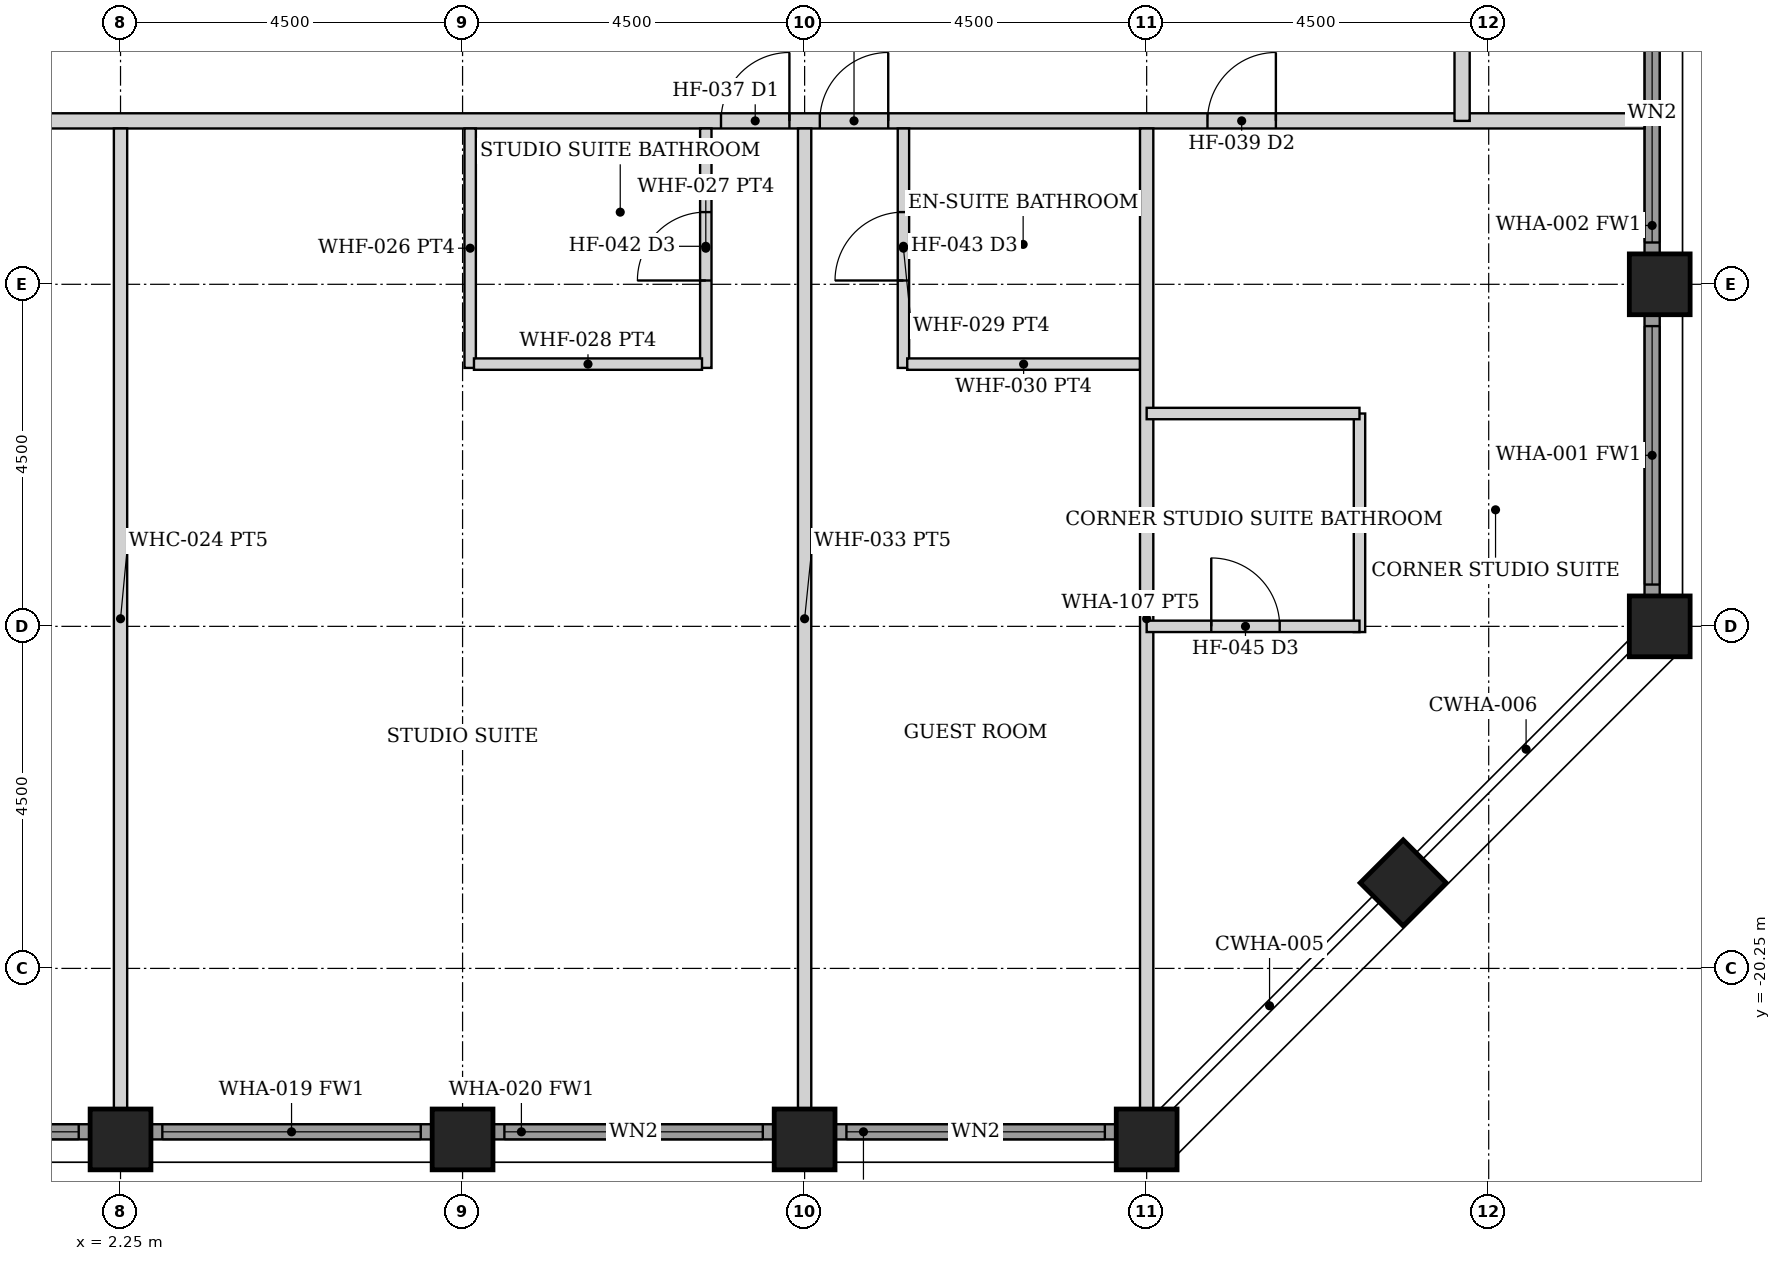
"""IFC4 building model, lengths in metres.
Left out: names, types, materials, properties, quantities, classifications, styles, units other than length and angle.
Written with IfcOpenShell. Run it as: python <this file> out.ifc"""

import sys

from ifc_helpers import new_model, si_unit, direction, frame, frame_2d, origin, origin_2d, place, context, subcontext, project, spatial, rectangle, hollow_rectangle, extrude, element, fill, save


model = new_model("IFC4")
c1 = context("Model", 3, precision=1e-05, world=origin(), true_north=direction((0.0, 1.0)))
c2 = subcontext(c1, "Body", "Model", "MODEL_VIEW")
j1 = project(units=[si_unit("LENGTHUNIT", "METRE"), si_unit("PLANEANGLEUNIT", "RADIAN")], contexts=[c1])
p1 = place(None, origin())
s1 = spatial("IfcSite", under=j1, at=p1, CompositionType="ELEMENT")
p2 = place(p1, origin())
s2 = spatial("IfcBuilding", under=s1, at=p2, CompositionType="ELEMENT")
p3 = place(p2, frame((0.0, 0.0, 172.4)))
s3 = spatial("IfcBuildingStorey", under=s2, at=p3, CompositionType="ELEMENT", Elevation=172.4)
for number, where, z_axis, x_axis in (
    (1, (22.5, -15.75, 0.0), (0.0, 0.0, 1.0), (1.0, 0.0, 0.0)),
    (2, (22.5, -11.25, 0.0), (0.0, 0.0, 1.0), (1.0, 0.0, 0.0)),
    (3, (2.25, -22.5, 0.0), (0.0, 0.0, 1.0), (0.0, 1.0, 0.0)),
    (4, (6.75, -22.5, 0.0), (0.0, 0.0, 1.0), (0.0, 1.0, 0.0)),
    (5, (11.25, -22.5, 0.0), (0.0, 0.0, 1.0), (0.0, 1.0, 0.0)),
    (6, (15.75, -22.5, 0.0), (0.0, 0.0, 1.0), (0.0, 1.0, 0.0)),
    (7, (19.125, -19.125, 0.0), (0.0, 0.0, 1.0), (0.707, -0.707, 0.0)),
):
    element("IfcColumn", number, at=place(p3, frame(where, z_axis=z_axis, x_axis=x_axis)), inside=s3, PredefinedType="COLUMN", context=c2, shape_type="SweptSolid", body=[
        extrude(hollow_rectangle(XDim=0.8, YDim=0.8, WallThickness=0.045, at=origin_2d()), origin(), (0.0, 0.0, 1.0), 3.6),
    ])
p4 = place(p3, frame((-1.845, -22.4, 0.0), z_axis=(0.0, 0.0, 1.0), x_axis=(1.0, 0.0, 0.0)))
e8 = element("IfcWall", 8, at=p4, inside=s3, PredefinedType="SOLIDWALL", context=c2, shape_type="SweptSolid", body=[
    extrude(rectangle(XDim=3.69, YDim=0.2, at=frame_2d((1.845, 0.0))), origin(), (0.0, 0.0, 1.0), 2.479),
])
p5 = place(p4, frame((0.145, 0.0, 0.3)))
e9 = element("IfcOpeningElement", 9, at=p5, cuts=e8, PredefinedType="OPENING", context=c2, shape_type="SweptSolid", body=[
    extrude(rectangle(XDim=3.4, YDim=2.029, at=frame_2d((1.7, 1.015))), frame((0.0, 0.11, 0.0), z_axis=(0.0, -1.0, 0.0), x_axis=(1.0, 0.0, 0.0)), (0.0, 0.0, 1.0), 0.22),
])
p6 = place(p3, frame((2.655, -22.4, 0.0), z_axis=(0.0, 0.0, 1.0), x_axis=(1.0, 0.0, 0.0)))
e10 = element("IfcWall", 10, at=p6, inside=s3, PredefinedType="SOLIDWALL", context=c2, shape_type="SweptSolid", body=[
    extrude(rectangle(XDim=3.69, YDim=0.2, at=frame_2d((1.845, 0.0))), origin(), (0.0, 0.0, 1.0), 2.479),
])
p7 = place(p6, frame((0.145, 0.0, 0.3)))
e11 = element("IfcOpeningElement", 11, at=p7, cuts=e10, PredefinedType="OPENING", context=c2, shape_type="SweptSolid", body=[
    extrude(rectangle(XDim=3.4, YDim=2.029, at=frame_2d((1.7, 1.015))), frame((0.0, 0.11, 0.0), z_axis=(0.0, -1.0, 0.0), x_axis=(1.0, 0.0, 0.0)), (0.0, 0.0, 1.0), 0.22),
])
p8 = place(p3, frame((7.155, -22.4, 0.0), z_axis=(0.0, 0.0, 1.0), x_axis=(1.0, 0.0, 0.0)))
e12 = element("IfcWall", 12, at=p8, inside=s3, PredefinedType="SOLIDWALL", context=c2, shape_type="SweptSolid", body=[
    extrude(rectangle(XDim=3.69, YDim=0.2, at=frame_2d((1.845, 0.0))), origin(), (0.0, 0.0, 1.0), 2.479),
])
p9 = place(p8, frame((0.145, 0.0, 0.3)))
e13 = element("IfcOpeningElement", 13, at=p9, cuts=e12, PredefinedType="OPENING", context=c2, shape_type="SweptSolid", body=[
    extrude(rectangle(XDim=3.4, YDim=2.029, at=frame_2d((1.7, 1.015))), frame((0.0, 0.11, 0.0), z_axis=(0.0, -1.0, 0.0), x_axis=(1.0, 0.0, 0.0)), (0.0, 0.0, 1.0), 0.22),
])
p10 = place(p3, frame((11.655, -22.4, 0.0), z_axis=(0.0, 0.0, 1.0), x_axis=(1.0, 0.0, 0.0)))
e14 = element("IfcWall", 14, at=p10, inside=s3, PredefinedType="SOLIDWALL", context=c2, shape_type="SweptSolid", body=[
    extrude(rectangle(XDim=3.69, YDim=0.2, at=frame_2d((1.845, 0.0))), origin(), (0.0, 0.0, 1.0), 2.479),
])
p11 = place(p10, frame((0.145, 0.0, 0.3)))
e15 = element("IfcOpeningElement", 15, at=p11, cuts=e14, PredefinedType="OPENING", context=c2, shape_type="SweptSolid", body=[
    extrude(rectangle(XDim=3.4, YDim=2.029, at=frame_2d((1.7, 1.015))), frame((0.0, 0.11, 0.0), z_axis=(0.0, -1.0, 0.0), x_axis=(1.0, 0.0, 0.0)), (0.0, 0.0, 1.0), 0.22),
])
p12 = place(p3, frame((22.4, -15.345, 0.0), z_axis=(0.0, 0.0, 1.0), x_axis=(0.0, 1.0, 0.0)))
e16 = element("IfcWall", 16, at=p12, inside=s3, PredefinedType="SOLIDWALL", context=c2, shape_type="SweptSolid", body=[
    extrude(rectangle(XDim=3.69, YDim=0.2, at=frame_2d((1.845, 0.0))), origin(), (0.0, 0.0, 1.0), 2.479),
])
p13 = place(p12, frame((0.145, 0.0, 0.3)))
e17 = element("IfcOpeningElement", 17, at=p13, cuts=e16, PredefinedType="OPENING", context=c2, shape_type="SweptSolid", body=[
    extrude(rectangle(XDim=3.4, YDim=2.029, at=frame_2d((1.7, 1.015))), frame((0.0, 0.11, 0.0), z_axis=(0.0, -1.0, 0.0), x_axis=(1.0, 0.0, 0.0)), (0.0, 0.0, 1.0), 0.22),
])
p14 = place(p3, frame((22.4, -10.845, 0.0), z_axis=(0.0, 0.0, 1.0), x_axis=(0.0, 1.0, 0.0)))
e18 = element("IfcWall", 18, at=p14, inside=s3, PredefinedType="SOLIDWALL", context=c2, shape_type="SweptSolid", body=[
    extrude(rectangle(XDim=3.69, YDim=0.2, at=frame_2d((1.845, 0.0))), origin(), (0.0, 0.0, 1.0), 2.479),
])
p15 = place(p14, frame((0.145, 0.0, 0.3)))
e19 = element("IfcOpeningElement", 19, at=p15, cuts=e18, PredefinedType="OPENING", context=c2, shape_type="SweptSolid", body=[
    extrude(rectangle(XDim=3.4, YDim=2.029, at=frame_2d((1.7, 1.015))), frame((0.0, 0.11, 0.0), z_axis=(0.0, -1.0, 0.0), x_axis=(1.0, 0.0, 0.0)), (0.0, 0.0, 1.0), 0.22),
])
p16 = place(p3, frame((-22.3, -9.1, 0.0), z_axis=(0.0, 0.0, 1.0), x_axis=(1.0, 0.0, 0.0)))
e20 = element("IfcWall", 20, at=p16, inside=s3, PredefinedType="PARTITIONING", context=c2, shape_type="SweptSolid", body=[
    extrude(rectangle(XDim=44.6, YDim=0.2, at=frame_2d((22.3, 0.0))), origin(), (0.0, 0.0, 1.0), 2.473),
])
p17 = place(p16, frame((6.75, 0.0, 0.0)))
e21 = element("IfcOpeningElement", 21, at=p17, cuts=e20, PredefinedType="OPENING", context=c2, shape_type="SweptSolid", body=[
    extrude(rectangle(XDim=0.9, YDim=2.1, at=frame_2d((0.45, 1.05))), frame((0.0, 0.11, 0.0), z_axis=(0.0, -1.0, 0.0), x_axis=(1.0, 0.0, 0.0)), (0.0, 0.0, 1.0), 0.22),
])
p18 = place(p16, frame((15.75, 0.0, 0.0)))
e22 = element("IfcOpeningElement", 22, at=p18, cuts=e20, PredefinedType="OPENING", context=c2, shape_type="SweptSolid", body=[
    extrude(rectangle(XDim=0.9, YDim=2.1, at=frame_2d((0.45, 1.05))), frame((0.0, 0.11, 0.0), z_axis=(0.0, -1.0, 0.0), x_axis=(1.0, 0.0, 0.0)), (0.0, 0.0, 1.0), 0.22),
])
p19 = place(p16, frame((32.45, 0.0, 0.0)))
e23 = element("IfcOpeningElement", 23, at=p19, cuts=e20, PredefinedType="OPENING", context=c2, shape_type="SweptSolid", body=[
    extrude(rectangle(XDim=0.9, YDim=2.1, at=frame_2d((0.45, 1.05))), frame((0.0, 0.11, 0.0), z_axis=(0.0, -1.0, 0.0), x_axis=(1.0, 0.0, 0.0)), (0.0, 0.0, 1.0), 0.22),
])
p20 = place(p16, frame((33.75, 0.0, 0.0)))
e24 = element("IfcOpeningElement", 24, at=p20, cuts=e20, PredefinedType="OPENING", context=c2, shape_type="SweptSolid", body=[
    extrude(rectangle(XDim=0.9, YDim=2.1, at=frame_2d((0.45, 1.05))), frame((0.0, 0.11, 0.0), z_axis=(0.0, -1.0, 0.0), x_axis=(1.0, 0.0, 0.0)), (0.0, 0.0, 1.0), 0.22),
])
p21 = place(p16, frame((38.85, 0.0, 0.0)))
e25 = element("IfcOpeningElement", 25, at=p21, cuts=e20, PredefinedType="OPENING", context=c2, shape_type="SweptSolid", body=[
    extrude(rectangle(XDim=0.9, YDim=2.1, at=frame_2d((0.45, 1.05))), frame((0.0, 0.11, 0.0), z_axis=(0.0, -1.0, 0.0), x_axis=(1.0, 0.0, 0.0)), (0.0, 0.0, 1.0), 0.22),
])
p22 = place(p16, frame((4.85, 0.0, 0.0)))
e26 = element("IfcOpeningElement", 26, at=p22, cuts=e20, PredefinedType="OPENING", context=c2, shape_type="SweptSolid", body=[
    extrude(rectangle(XDim=0.9, YDim=2.1, at=frame_2d((0.45, 1.05))), frame((0.0, 0.11, 0.0), z_axis=(0.0, -1.0, 0.0), x_axis=(1.0, 0.0, 0.0)), (0.0, 0.0, 1.0), 0.22),
])
p23 = place(p3, frame((19.9, -9.1, 0.0), z_axis=(0.0, 0.0, 1.0), x_axis=(0.0, 1.0, 0.0)))
e27 = element("IfcWall", 27, at=p23, inside=s3, PredefinedType="PARTITIONING", context=c2, shape_type="SweptSolid", body=[
    extrude(rectangle(XDim=18.2, YDim=0.2, at=frame_2d((9.1, 0.0))), origin(), (0.0, 0.0, 1.0), 2.473),
])
p24 = place(p23, frame((8.425, 0.0, 0.0)))
e28 = element("IfcOpeningElement", 28, at=p24, cuts=e27, PredefinedType="OPENING", context=c2, shape_type="SweptSolid", body=[
    extrude(rectangle(XDim=1.35, YDim=2.1, at=frame_2d((0.675, 1.05))), frame((0.0, 0.11, 0.0), z_axis=(0.0, -1.0, 0.0), x_axis=(1.0, 0.0, 0.0)), (0.0, 0.0, 1.0), 0.22),
])
p25 = place(p3, frame((9.95, -12.35, 0.0), z_axis=(0.0, 0.0, 1.0), x_axis=(0.0, 1.0, 0.0)))
e29 = element("IfcWall", 29, at=p25, inside=s3, PredefinedType="PARTITIONING", context=c2, shape_type="SweptSolid", body=[
    extrude(rectangle(XDim=3.15, YDim=0.15, at=frame_2d((1.575, 0.0))), origin(), (0.0, 0.0, 1.0), 2.473),
])
p26 = place(p25, frame((1.15, 0.0, 0.0)))
e30 = element("IfcOpeningElement", 30, at=p26, cuts=e29, PredefinedType="OPENING", context=c2, shape_type="SweptSolid", body=[
    extrude(rectangle(XDim=0.9, YDim=2.1, at=frame_2d((0.45, 1.05))), frame((0.0, 0.085, 0.0), z_axis=(0.0, -1.0, 0.0), x_axis=(1.0, 0.0, 0.0)), (0.0, 0.0, 1.0), 0.17),
])
p27 = place(p3, frame((6.85, -12.35, 0.0), z_axis=(0.0, 0.0, 1.0), x_axis=(0.0, 1.0, 0.0)))
e31 = element("IfcWall", 31, at=p27, inside=s3, PredefinedType="PARTITIONING", context=c2, shape_type="SweptSolid", body=[
    extrude(rectangle(XDim=3.15, YDim=0.15, at=frame_2d((1.575, 0.0))), origin(), (0.0, 0.0, 1.0), 2.473),
])
p28 = place(p3, frame((6.9, -12.3, 0.0), z_axis=(0.0, 0.0, 1.0), x_axis=(1.0, 0.0, 0.0)))
e32 = element("IfcWall", 32, at=p28, inside=s3, PredefinedType="PARTITIONING", context=c2, shape_type="SweptSolid", body=[
    extrude(rectangle(XDim=3.0, YDim=0.15, at=frame_2d((1.5, 0.0))), origin(), (0.0, 0.0, 1.0), 2.473),
])
p29 = place(p3, frame((12.55, -12.35, 0.0), z_axis=(0.0, 0.0, 1.0), x_axis=(0.0, 1.0, 0.0)))
e33 = element("IfcWall", 33, at=p29, inside=s3, PredefinedType="PARTITIONING", context=c2, shape_type="SweptSolid", body=[
    extrude(rectangle(XDim=3.15, YDim=0.15, at=frame_2d((1.575, 0.0))), origin(), (0.0, 0.0, 1.0), 2.473),
])
p30 = place(p29, frame((1.15, 0.0, 0.0)))
e34 = element("IfcOpeningElement", 34, at=p30, cuts=e33, PredefinedType="OPENING", context=c2, shape_type="SweptSolid", body=[
    extrude(rectangle(XDim=0.9, YDim=2.1, at=frame_2d((0.45, 1.05))), frame((0.0, 0.085, 0.0), z_axis=(0.0, -1.0, 0.0), x_axis=(1.0, 0.0, 0.0)), (0.0, 0.0, 1.0), 0.17),
])
p31 = place(p3, frame((12.6, -12.3, 0.0), z_axis=(0.0, 0.0, 1.0), x_axis=(1.0, 0.0, 0.0)))
e35 = element("IfcWall", 35, at=p31, inside=s3, PredefinedType="PARTITIONING", context=c2, shape_type="SweptSolid", body=[
    extrude(rectangle(XDim=3.062, YDim=0.15, at=frame_2d((1.531, 0.0))), origin(), (0.0, 0.0, 1.0), 2.473),
])
for number, where, z_axis, x_axis in (
    (36, (2.25, -22.1, 0.0), (0.0, 0.0, 1.0), (0.0, 1.0, 0.0)),
    (37, (11.25, -22.1, 0.0), (0.0, 0.0, 1.0), (0.0, 1.0, 0.0)),
    (38, (15.75, -22.1, 0.0), (0.0, 0.0, 1.0), (0.0, 1.0, 0.0)),
):
    element("IfcWall", number, at=place(p3, frame(where, z_axis=z_axis, x_axis=x_axis)), inside=s3, PredefinedType="PARTITIONING", context=c2, shape_type="SweptSolid", body=[
        extrude(rectangle(XDim=12.9, YDim=0.175, at=frame_2d((6.45, 0.0))), origin(), (0.0, 0.0, 1.0), 2.473),
    ])
p32 = place(p3, frame((18.55, -15.825, 0.0), z_axis=(0.0, 0.0, 1.0), x_axis=(0.0, 1.0, 0.0)))
e39 = element("IfcWall", 39, at=p32, inside=s3, PredefinedType="PARTITIONING", context=c2, shape_type="SweptSolid", body=[
    extrude(rectangle(XDim=2.875, YDim=0.15, at=frame_2d((1.438, 0.0))), origin(), (0.0, 0.0, 1.0), 2.473),
])
p33 = place(p3, frame((15.75, -12.95, 0.0), z_axis=(0.0, 0.0, 1.0), x_axis=(1.0, 0.0, 0.0)))
e40 = element("IfcWall", 40, at=p33, inside=s3, PredefinedType="PARTITIONING", context=c2, shape_type="SweptSolid", body=[
    extrude(rectangle(XDim=2.8, YDim=0.15, at=frame_2d((1.4, 0.0))), origin(), (0.0, 0.0, 1.0), 2.473),
])
p34 = place(p3, frame((15.75, -15.75, 0.0), z_axis=(0.0, 0.0, 1.0), x_axis=(1.0, 0.0, 0.0)))
e41 = element("IfcWall", 41, at=p34, inside=s3, PredefinedType="PARTITIONING", context=c2, shape_type="SweptSolid", body=[
    extrude(rectangle(XDim=2.8, YDim=0.15, at=frame_2d((1.4, 0.0))), origin(), (0.0, 0.0, 1.0), 2.473),
])
p35 = place(p34, frame((0.85, 0.0, 0.0)))
e42 = element("IfcOpeningElement", 42, at=p35, cuts=e41, PredefinedType="OPENING", context=c2, shape_type="SweptSolid", body=[
    extrude(rectangle(XDim=0.9, YDim=2.1, at=frame_2d((0.45, 1.05))), frame((0.0, 0.085, 0.0), z_axis=(0.0, -1.0, 0.0), x_axis=(1.0, 0.0, 0.0)), (0.0, 0.0, 1.0), 0.17),
])
p36 = place(p5, origin())
e43 = element("IfcWindow", 43, at=p36, inside=s3, PartitioningType="SINGLE_PANEL", PredefinedType="WINDOW", context=c2, shape_type="SweptSolid", body=[
    extrude(rectangle(XDim=3.4, YDim=2.029, at=frame_2d((1.7, 1.015))), frame((0.0, 0.03, 0.0), z_axis=(0.0, -1.0, 0.0), x_axis=(1.0, 0.0, 0.0)), (0.0, 0.0, 1.0), 0.06),
])
fill(e9, e43)
p37 = place(p7, origin())
e44 = element("IfcWindow", 44, at=p37, inside=s3, PartitioningType="SINGLE_PANEL", PredefinedType="WINDOW", context=c2, shape_type="SweptSolid", body=[
    extrude(rectangle(XDim=3.4, YDim=2.029, at=frame_2d((1.7, 1.015))), frame((0.0, 0.03, 0.0), z_axis=(0.0, -1.0, 0.0), x_axis=(1.0, 0.0, 0.0)), (0.0, 0.0, 1.0), 0.06),
])
fill(e11, e44)
p38 = place(p9, origin())
e45 = element("IfcWindow", 45, at=p38, inside=s3, PartitioningType="SINGLE_PANEL", PredefinedType="WINDOW", context=c2, shape_type="SweptSolid", body=[
    extrude(rectangle(XDim=3.4, YDim=2.029, at=frame_2d((1.7, 1.015))), frame((0.0, 0.03, 0.0), z_axis=(0.0, -1.0, 0.0), x_axis=(1.0, 0.0, 0.0)), (0.0, 0.0, 1.0), 0.06),
])
fill(e13, e45)
p39 = place(p11, origin())
e46 = element("IfcWindow", 46, at=p39, inside=s3, PartitioningType="SINGLE_PANEL", PredefinedType="WINDOW", context=c2, shape_type="SweptSolid", body=[
    extrude(rectangle(XDim=3.4, YDim=2.029, at=frame_2d((1.7, 1.015))), frame((0.0, 0.03, 0.0), z_axis=(0.0, -1.0, 0.0), x_axis=(1.0, 0.0, 0.0)), (0.0, 0.0, 1.0), 0.06),
])
fill(e15, e46)
p40 = place(p13, origin())
e47 = element("IfcWindow", 47, at=p40, inside=s3, PartitioningType="SINGLE_PANEL", PredefinedType="WINDOW", context=c2, shape_type="SweptSolid", body=[
    extrude(rectangle(XDim=3.4, YDim=2.029, at=frame_2d((1.7, 1.015))), frame((0.0, 0.03, 0.0), z_axis=(0.0, -1.0, 0.0), x_axis=(1.0, 0.0, 0.0)), (0.0, 0.0, 1.0), 0.06),
])
fill(e17, e47)
p41 = place(p15, origin())
e48 = element("IfcWindow", 48, at=p41, inside=s3, PartitioningType="SINGLE_PANEL", PredefinedType="WINDOW", context=c2, shape_type="SweptSolid", body=[
    extrude(rectangle(XDim=3.4, YDim=2.029, at=frame_2d((1.7, 1.015))), frame((0.0, 0.03, 0.0), z_axis=(0.0, -1.0, 0.0), x_axis=(1.0, 0.0, 0.0)), (0.0, 0.0, 1.0), 0.06),
])
fill(e19, e48)
p42 = place(p19, origin())
e49 = element("IfcDoor", 49, at=p42, inside=s3, OperationType="SINGLE_SWING_RIGHT", PredefinedType="DOOR", context=c2, shape_type="SweptSolid", body=[
    extrude(rectangle(XDim=0.9, YDim=2.1, at=frame_2d((0.45, 1.05))), frame((0.0, 0.025, 0.0), z_axis=(0.0, -1.0, 0.0), x_axis=(1.0, 0.0, 0.0)), (0.0, 0.0, 1.0), 0.05),
])
fill(e23, e49)
p43 = place(p26, origin())
e50 = element("IfcDoor", 50, at=p43, inside=s3, OperationType="SINGLE_SWING_LEFT", PredefinedType="DOOR", context=c2, shape_type="SweptSolid", body=[
    extrude(rectangle(XDim=0.9, YDim=2.1, at=frame_2d((0.45, 1.05))), frame((0.0, 0.025, 0.0), z_axis=(0.0, -1.0, 0.0), x_axis=(1.0, 0.0, 0.0)), (0.0, 0.0, 1.0), 0.05),
])
fill(e30, e50)
p44 = place(p20, origin())
e51 = element("IfcDoor", 51, at=p44, inside=s3, OperationType="SINGLE_SWING_RIGHT", PredefinedType="DOOR", context=c2, shape_type="SweptSolid", body=[
    extrude(rectangle(XDim=0.9, YDim=2.1, at=frame_2d((0.45, 1.05))), frame((0.0, 0.025, 0.0), z_axis=(0.0, -1.0, 0.0), x_axis=(1.0, 0.0, 0.0)), (0.0, 0.0, 1.0), 0.05),
])
fill(e24, e51)
p45 = place(p30, origin())
e52 = element("IfcDoor", 52, at=p45, inside=s3, OperationType="SINGLE_SWING_LEFT", PredefinedType="DOOR", context=c2, shape_type="SweptSolid", body=[
    extrude(rectangle(XDim=0.9, YDim=2.1, at=frame_2d((0.45, 1.05))), frame((0.0, 0.025, 0.0), z_axis=(0.0, -1.0, 0.0), x_axis=(1.0, 0.0, 0.0)), (0.0, 0.0, 1.0), 0.05),
])
fill(e34, e52)
p46 = place(p21, origin())
e53 = element("IfcDoor", 53, at=p46, inside=s3, OperationType="SINGLE_SWING_RIGHT", PredefinedType="DOOR", context=c2, shape_type="SweptSolid", body=[
    extrude(rectangle(XDim=0.9, YDim=2.1, at=frame_2d((0.45, 1.05))), frame((0.0, 0.025, 0.0), z_axis=(0.0, -1.0, 0.0), x_axis=(1.0, 0.0, 0.0)), (0.0, 0.0, 1.0), 0.05),
])
fill(e25, e53)
p47 = place(p35, origin())
e54 = element("IfcDoor", 54, at=p47, inside=s3, OperationType="SINGLE_SWING_LEFT", PredefinedType="DOOR", context=c2, shape_type="SweptSolid", body=[
    extrude(rectangle(XDim=0.9, YDim=2.1, at=frame_2d((0.45, 1.05))), frame((0.0, 0.025, 0.0), z_axis=(0.0, -1.0, 0.0), x_axis=(1.0, 0.0, 0.0)), (0.0, 0.0, 1.0), 0.05),
])
fill(e42, e54)
save(model, sys.argv[1])
